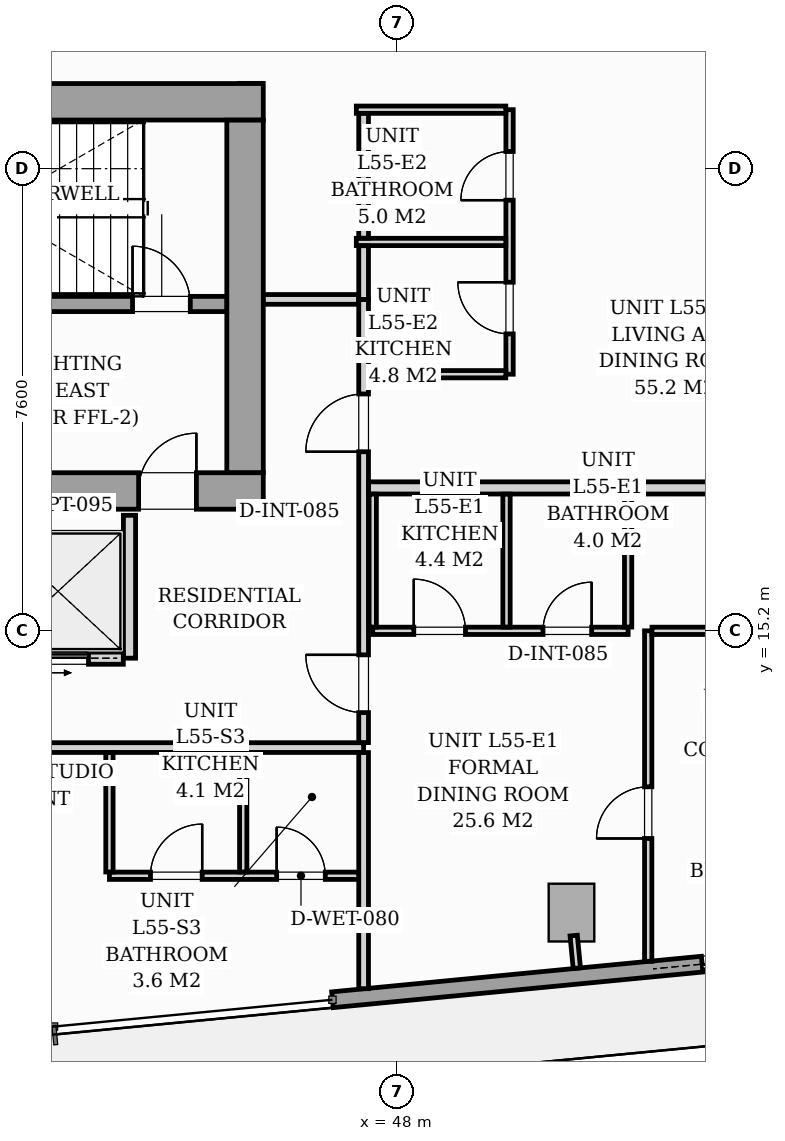
"""IFC4 building model, lengths in metres.
Left out: names, types, materials, properties, quantities, classifications, styles, units other than length and angle.
Written with IfcOpenShell. Run it as: python <this file> out.ifc"""

import sys

from ifc_helpers import new_model, si_unit, direction, frame, frame_2d, origin, origin_2d, place, context, subcontext, project, spatial, rectangle, i_section, extrude, source, transform, mapped, element, fill, save


model = new_model("IFC4")
c1 = context("Model", 3, precision=1e-05, world=origin(), true_north=direction((0.0, 1.0)))
c2 = subcontext(c1, "Body", "Model", "MODEL_VIEW")
j1 = project(units=[si_unit("LENGTHUNIT", "METRE"), si_unit("PLANEANGLEUNIT", "RADIAN")], contexts=[c1])
p1 = place(None, origin())
s1 = spatial("IfcSite", under=j1, at=p1, CompositionType="ELEMENT")
p2 = place(p1, origin())
s2 = spatial("IfcBuilding", under=s1, at=p2, CompositionType="ELEMENT")
p3 = place(p2, frame((0.0, 0.0, 192.2)))
s3 = spatial("IfcBuildingStorey", under=s2, at=p3, CompositionType="ELEMENT", Elevation=192.2)
m1 = source(origin(), c2, "Body", "SweptSolid", [
    extrude(i_section(OverallWidth=0.416, OverallDepth=0.446, WebThickness=0.039, FlangeThickness=0.063, FilletRadius=0.018, at=origin_2d()), origin(), (0.0, 0.0, 1.0), 3.196),
])
for number, where, z_axis, x_axis in (
    (1, (45.6, 17.4, 0.002), (0.0, 0.0, 1.0), (1.0, 0.0, 0.0)),
    (2, (45.6, 24.0, 0.002), (0.0, 0.0, 1.0), (1.0, 0.0, 0.0)),
):
    element("IfcColumn", number, at=place(p3, frame(where, z_axis=z_axis, x_axis=x_axis)), inside=s3, PredefinedType="PILASTER", context=c2, shape_type="MappedRepresentation", body=[
        mapped(m1, transform((0.0, 0.0, 0.0), scale=1.0)),
    ])
m2 = source(origin(), c2, "Body", "SweptSolid", [
    extrude(rectangle(XDim=0.75, YDim=0.95, at=origin_2d()), origin(), (0.0, 0.0, 1.0), 3.196),
])
p4 = place(p3, frame((50.868, 10.566, 0.002), z_axis=(0.0, 0.0, 1.0), x_axis=(0.995396198367, 0.09584575252, 0.0)))
e3 = element("IfcColumn", 3, at=p4, inside=s3, PredefinedType="COLUMN", context=c2, shape_type="MappedRepresentation", body=[
    mapped(m2, transform((0.0, 0.0, 0.0), scale=1.0)),
])
p5 = place(p3, frame((62.963, 10.676, 0.0), z_axis=(0.0, 0.0, 1.0), x_axis=(-0.995395627913, -0.095851676732, 0.0)))
e4 = element("IfcWall", 4, at=p5, inside=s3, PredefinedType="STANDARD", context=c2, shape_type="SweptSolid", body=[
    extrude(rectangle(XDim=16.1, YDim=0.26, at=frame_2d((8.05, 0.0))), origin(), (0.0, 0.0, 1.0), 2.94),
])
p6 = place(p5, frame((8.192, 0.0, 0.0)))
e5 = element("IfcOpeningElement", 5, at=p6, cuts=e4, PredefinedType="OPENING", context=c2, shape_type="SweptSolid", body=[
    extrude(rectangle(XDim=1.8, YDim=2.06, at=frame_2d((0.9, 1.03))), frame((0.0, 0.14, 0.0), z_axis=(0.0, -1.0, 0.0), x_axis=(1.0, 0.0, 0.0)), (0.0, 0.0, 1.0), 0.28),
])
p7 = place(p5, frame((2.05, 0.0, 0.65)))
e6 = element("IfcOpeningElement", 6, at=p7, cuts=e4, PredefinedType="OPENING", context=c2, shape_type="SweptSolid", body=[
    extrude(rectangle(XDim=1.6, YDim=1.5, at=frame_2d((0.8, 0.75))), frame((0.0, 0.14, 0.0), z_axis=(0.0, -1.0, 0.0), x_axis=(1.0, 0.0, 0.0)), (0.0, 0.0, 1.0), 0.28),
])
p8 = place(p3, frame((26.2, 17.5, 0.0), z_axis=(0.0, 0.0, 1.0), x_axis=(1.0, 0.0, 0.0)))
e7 = element("IfcWall", 7, at=p8, inside=s3, PredefinedType="SHEAR", context=c2, shape_type="SweptSolid", body=[
    extrude(rectangle(XDim=19.6, YDim=0.6, at=frame_2d((9.8, 0.0))), origin(), (0.0, 0.0, 1.0), 3.2),
])
p9 = place(p8, frame((0.95, 0.0, 0.0)))
e8 = element("IfcOpeningElement", 8, at=p9, cuts=e7, PredefinedType="OPENING", context=c2, shape_type="SweptSolid", body=[
    extrude(rectangle(XDim=0.95, YDim=2.06, at=frame_2d((0.475, 1.03))), frame((0.0, 0.31, 0.0), z_axis=(0.0, -1.0, 0.0), x_axis=(1.0, 0.0, 0.0)), (0.0, 0.0, 1.0), 0.62),
])
p10 = place(p8, frame((9.38, 0.0, 0.0)))
e9 = element("IfcOpeningElement", 9, at=p10, cuts=e7, PredefinedType="OPENING", context=c2, shape_type="SweptSolid", body=[
    extrude(rectangle(XDim=0.85, YDim=2.0, at=frame_2d((0.425, 1.0))), frame((0.0, 0.31, 0.0), z_axis=(0.0, -1.0, 0.0), x_axis=(1.0, 0.0, 0.0)), (0.0, 0.0, 1.0), 0.62),
])
p11 = place(p8, frame((17.55, 0.0, 0.0)))
e10 = element("IfcOpeningElement", 10, at=p11, cuts=e7, PredefinedType="OPENING", context=c2, shape_type="SweptSolid", body=[
    extrude(rectangle(XDim=0.95, YDim=2.06, at=frame_2d((0.475, 1.03))), frame((0.0, 0.31, 0.0), z_axis=(0.0, -1.0, 0.0), x_axis=(1.0, 0.0, 0.0)), (0.0, 0.0, 1.0), 0.62),
])
p12 = place(p3, frame((26.2, 23.9, 0.0), z_axis=(0.0, 0.0, 1.0), x_axis=(1.0, 0.0, 0.0)))
e11 = element("IfcWall", 11, at=p12, inside=s3, PredefinedType="SHEAR", context=c2, shape_type="SweptSolid", body=[
    extrude(rectangle(XDim=19.6, YDim=0.6, at=frame_2d((9.8, 0.0))), origin(), (0.0, 0.0, 1.0), 3.2),
])
p13 = place(p3, frame((45.5, 17.802, 0.0), z_axis=(0.0, 0.0, 1.0), x_axis=(0.0, 1.0, 0.0)))
e12 = element("IfcWall", 12, at=p13, inside=s3, PredefinedType="SHEAR", context=c2, shape_type="SweptSolid", body=[
    extrude(rectangle(XDim=5.796, YDim=0.6, at=frame_2d((2.898, 0.0))), origin(), (0.0, 0.0, 1.0), 3.2),
])
p14 = place(p3, frame((37.05, 20.575, 0.0), z_axis=(0.0, 0.0, 1.0), x_axis=(1.0, 0.0, 0.0)))
e13 = element("IfcWall", 13, at=p14, inside=s3, PredefinedType="SOLIDWALL", context=c2, shape_type="SweptSolid", body=[
    extrude(rectangle(XDim=8.148, YDim=0.25, at=frame_2d((4.074, 0.0))), origin(), (0.0, 0.0, 1.0), 3.2),
])
p15 = place(p14, frame((6.6, 0.0, 0.0)))
e14 = element("IfcOpeningElement", 14, at=p15, cuts=e13, PredefinedType="OPENING", context=c2, shape_type="SweptSolid", body=[
    extrude(rectangle(XDim=0.95, YDim=2.06, at=frame_2d((0.475, 1.03))), frame((0.0, 0.135, 0.0), z_axis=(0.0, -1.0, 0.0), x_axis=(1.0, 0.0, 0.0)), (0.0, 0.0, 1.0), 0.27),
])
p16 = place(p3, frame((43.6, 14.75, 0.0), z_axis=(0.0, 0.0, 1.0), x_axis=(0.0, 1.0, 0.0)))
e15 = element("IfcWall", 15, at=p16, inside=s3, PredefinedType="PARTITIONING", context=c2, shape_type="SweptSolid", body=[
    extrude(rectangle(XDim=2.35, YDim=0.2, at=frame_2d((1.175, 0.0))), origin(), (0.0, 0.0, 1.0), 2.94),
])
p17 = place(p3, frame((41.352, 14.75, 0.0), z_axis=(0.0, 0.0, 1.0), x_axis=(1.0, 0.0, 0.0)))
e16 = element("IfcWall", 16, at=p17, inside=s3, PredefinedType="PARTITIONING", context=c2, shape_type="SweptSolid", body=[
    extrude(rectangle(XDim=2.146, YDim=0.2, at=frame_2d((1.073, 0.0))), origin(), (0.0, 0.0, 1.0), 2.94),
])
p18 = place(p17, frame((0.523, 0.0, 0.0)))
e17 = element("IfcOpeningElement", 17, at=p18, cuts=e16, PredefinedType="OPENING", context=c2, shape_type="SweptSolid", body=[
    extrude(rectangle(XDim=1.05, YDim=2.08, at=frame_2d((0.525, 1.04))), frame((0.0, 0.11, 0.0), z_axis=(0.0, -1.0, 0.0), x_axis=(1.0, 0.0, 0.0)), (0.0, 0.0, 1.0), 0.22),
])
p19 = place(p3, frame((26.12, 13.28, 0.0), z_axis=(0.0, 0.0, 1.0), x_axis=(1.0, 0.0, 0.0)))
e18 = element("IfcWall", 18, at=p19, inside=s3, PredefinedType="PARTITIONING", context=c2, shape_type="SweptSolid", body=[
    extrude(rectangle(XDim=21.33, YDim=0.16, at=frame_2d((10.665, 0.0))), origin(), (0.0, 0.0, 1.0), 2.94),
])
p20 = place(p19, frame((4.704, 0.0, 0.0)))
e19 = element("IfcOpeningElement", 19, at=p20, cuts=e18, PredefinedType="OPENING", context=c2, shape_type="SweptSolid", body=[
    extrude(rectangle(XDim=0.95, YDim=2.06, at=frame_2d((0.475, 1.03))), frame((0.0, 0.09, 0.0), z_axis=(0.0, -1.0, 0.0), x_axis=(1.0, 0.0, 0.0)), (0.0, 0.0, 1.0), 0.18),
])
p21 = place(p19, frame((11.6, 0.0, 0.0)))
e20 = element("IfcOpeningElement", 20, at=p21, cuts=e18, PredefinedType="OPENING", context=c2, shape_type="SweptSolid", body=[
    extrude(rectangle(XDim=0.95, YDim=2.06, at=frame_2d((0.475, 1.03))), frame((0.0, 0.09, 0.0), z_axis=(0.0, -1.0, 0.0), x_axis=(1.0, 0.0, 0.0)), (0.0, 0.0, 1.0), 0.18),
])
p22 = place(p19, frame((14.976, 0.0, 0.0)))
e21 = element("IfcOpeningElement", 21, at=p22, cuts=e18, PredefinedType="OPENING", context=c2, shape_type="SweptSolid", body=[
    extrude(rectangle(XDim=0.95, YDim=2.06, at=frame_2d((0.475, 1.03))), frame((0.0, 0.09, 0.0), z_axis=(0.0, -1.0, 0.0), x_axis=(1.0, 0.0, 0.0)), (0.0, 0.0, 1.0), 0.18),
])
p23 = place(p3, frame((47.45, 9.315, 0.0), z_axis=(0.0, 0.0, 1.0), x_axis=(0.0, 1.0, 0.0)))
e22 = element("IfcWall", 22, at=p23, inside=s3, PredefinedType="PARTITIONING", context=c2, shape_type="SweptSolid", body=[
    extrude(rectangle(XDim=3.883, YDim=0.16, at=frame_2d((1.941, 0.0))), origin(), (0.0, 0.0, 1.0), 2.94),
])
p24 = place(p3, frame((47.45, 13.362, 0.0), z_axis=(0.0, 0.0, 1.0), x_axis=(0.0, 1.0, 0.0)))
e23 = element("IfcWall", 23, at=p24, inside=s3, PredefinedType="PARTITIONING", context=c2, shape_type="SweptSolid", body=[
    extrude(rectangle(XDim=7.288, YDim=0.16, at=frame_2d((3.644, 0.0))), origin(), (0.0, 0.0, 1.0), 2.94),
])
p25 = place(p24, frame((0.493, 0.0, 0.0)))
e24 = element("IfcOpeningElement", 24, at=p25, cuts=e23, PredefinedType="OPENING", context=c2, shape_type="SweptSolid", body=[
    extrude(rectangle(XDim=0.95, YDim=2.06, at=frame_2d((0.475, 1.03))), frame((0.0, 0.09, 0.0), z_axis=(0.0, -1.0, 0.0), x_axis=(1.0, 0.0, 0.0)), (0.0, 0.0, 1.0), 0.18),
])
p26 = place(p24, frame((4.783, 0.0, 0.0)))
e25 = element("IfcOpeningElement", 25, at=p26, cuts=e23, PredefinedType="OPENING", context=c2, shape_type="SweptSolid", body=[
    extrude(rectangle(XDim=0.95, YDim=2.06, at=frame_2d((0.475, 1.03))), frame((0.0, 0.09, 0.0), z_axis=(0.0, -1.0, 0.0), x_axis=(1.0, 0.0, 0.0)), (0.0, 0.0, 1.0), 0.18),
])
p27 = place(p3, frame((45.802, 20.65, 0.0), z_axis=(0.0, 0.0, 1.0), x_axis=(1.0, 0.0, 0.0)))
e26 = element("IfcWall", 26, at=p27, inside=s3, PredefinedType="PARTITIONING", context=c2, shape_type="SweptSolid", body=[
    extrude(rectangle(XDim=1.566, YDim=0.16, at=frame_2d((0.783, 0.0))), origin(), (0.0, 0.0, 1.0), 2.94),
])
p28 = place(p3, frame((43.27, 11.172, 0.0), z_axis=(0.0, 0.0, 1.0), x_axis=(1.0, 0.0, 0.0)))
e27 = element("IfcWall", 27, at=p28, inside=s3, PredefinedType="PARTITIONING", context=c2, shape_type="SweptSolid", body=[
    extrude(rectangle(XDim=4.098, YDim=0.12, at=frame_2d((2.049, 0.0))), origin(), (0.0, 0.0, 1.0), 2.94),
])
p29 = place(p28, frame((0.675, 0.0, 0.0)))
e28 = element("IfcOpeningElement", 28, at=p29, cuts=e27, PredefinedType="OPENING", context=c2, shape_type="SweptSolid", body=[
    extrude(rectangle(XDim=0.85, YDim=2.05, at=frame_2d((0.425, 1.025))), frame((0.0, 0.07, 0.0), z_axis=(0.0, -1.0, 0.0), x_axis=(1.0, 0.0, 0.0)), (0.0, 0.0, 1.0), 0.14),
])
p30 = place(p28, frame((2.75, 0.0, 0.0)))
e29 = element("IfcOpeningElement", 29, at=p30, cuts=e27, PredefinedType="OPENING", context=c2, shape_type="SweptSolid", body=[
    extrude(rectangle(XDim=0.8, YDim=2.02, at=frame_2d((0.4, 1.01))), frame((0.0, 0.07, 0.0), z_axis=(0.0, -1.0, 0.0), x_axis=(1.0, 0.0, 0.0)), (0.0, 0.0, 1.0), 0.14),
])
for number, where, z_axis, x_axis in (
    (30, (43.27, 11.234, 0.0), (0.0, 0.0, 1.0), (0.0, 1.0, 0.0)),
    (31, (45.47, 11.234, 0.0), (0.0, 0.0, 1.0), (0.0, 1.0, 0.0)),
):
    element("IfcWall", number, at=place(p3, frame(where, z_axis=z_axis, x_axis=x_axis)), inside=s3, PredefinedType="PARTITIONING", context=c2, shape_type="SweptSolid", body=[
        extrude(rectangle(XDim=1.964, YDim=0.12, at=frame_2d((0.982, 0.0))), origin(), (0.0, 0.0, 1.0), 2.94),
    ])
p31 = place(p3, frame((47.532, 17.55, 0.0), z_axis=(0.0, 0.0, 1.0), x_axis=(1.0, 0.0, 0.0)))
e32 = element("IfcWall", 32, at=p31, inside=s3, PredefinedType="PARTITIONING", context=c2, shape_type="SweptSolid", body=[
    extrude(rectangle(XDim=17.201, YDim=0.2, at=frame_2d((8.601, 0.0))), origin(), (0.0, 0.0, 1.0), 2.281),
])
p32 = place(p3, frame((47.6, 15.2, 0.0), z_axis=(0.0, 0.0, 1.0), x_axis=(1.0, 0.0, 0.0)))
e33 = element("IfcWall", 33, at=p32, inside=s3, PredefinedType="PARTITIONING", context=c2, shape_type="SweptSolid", body=[
    extrude(rectangle(XDim=4.2, YDim=0.12, at=frame_2d((2.1, 0.0))), origin(), (0.0, 0.0, 1.0), 2.94),
])
p33 = place(p32, frame((0.675, 0.0, 0.0)))
e34 = element("IfcOpeningElement", 34, at=p33, cuts=e33, PredefinedType="OPENING", context=c2, shape_type="SweptSolid", body=[
    extrude(rectangle(XDim=0.85, YDim=2.05, at=frame_2d((0.425, 1.025))), frame((0.0, 0.07, 0.0), z_axis=(0.0, -1.0, 0.0), x_axis=(1.0, 0.0, 0.0)), (0.0, 0.0, 1.0), 0.14),
])
p34 = place(p32, frame((2.8, 0.0, 0.0)))
e35 = element("IfcOpeningElement", 35, at=p34, cuts=e33, PredefinedType="OPENING", context=c2, shape_type="SweptSolid", body=[
    extrude(rectangle(XDim=0.8, YDim=2.02, at=frame_2d((0.4, 1.01))), frame((0.0, 0.07, 0.0), z_axis=(0.0, -1.0, 0.0), x_axis=(1.0, 0.0, 0.0)), (0.0, 0.0, 1.0), 0.14),
])
for number, where, z_axis, x_axis in (
    (36, (47.6, 15.262, 0.0), (0.0, 0.0, 1.0), (0.0, 1.0, 0.0)),
    (37, (49.8, 15.262, 0.0), (0.0, 0.0, 1.0), (0.0, 1.0, 0.0)),
    (38, (51.8, 15.262, 0.0), (0.0, 0.0, 1.0), (0.0, 1.0, 0.0)),
):
    element("IfcWall", number, at=place(p3, frame(where, z_axis=z_axis, x_axis=x_axis)), inside=s3, PredefinedType="PARTITIONING", context=c2, shape_type="SweptSolid", body=[
        extrude(rectangle(XDim=2.186, YDim=0.12, at=frame_2d((1.093, 0.0))), origin(), (0.0, 0.0, 1.0), 2.94),
    ])
p35 = place(p3, frame((52.13, 9.766, 0.0), z_axis=(0.0, 0.0, 1.0), x_axis=(0.0, 1.0, 0.0)))
e39 = element("IfcWall", 39, at=p35, inside=s3, PredefinedType="PARTITIONING", context=c2, shape_type="SweptSolid", body=[
    extrude(rectangle(XDim=5.434, YDim=0.12, at=frame_2d((2.717, 0.0))), origin(), (0.0, 0.0, 1.0), 2.94),
])
p36 = place(p35, frame((2.019, 0.0, 0.0)))
e40 = element("IfcOpeningElement", 40, at=p36, cuts=e39, PredefinedType="OPENING", context=c2, shape_type="SweptSolid", body=[
    extrude(rectangle(XDim=0.85, YDim=2.05, at=frame_2d((0.425, 1.025))), frame((0.0, 0.07, 0.0), z_axis=(0.0, -1.0, 0.0), x_axis=(1.0, 0.0, 0.0)), (0.0, 0.0, 1.0), 0.14),
])
p37 = place(p3, frame((52.192, 15.2, 0.0), z_axis=(0.0, 0.0, 1.0), x_axis=(1.0, 0.0, 0.0)))
e41 = element("IfcWall", 41, at=p37, inside=s3, PredefinedType="PARTITIONING", context=c2, shape_type="SweptSolid", body=[
    extrude(rectangle(XDim=4.206, YDim=0.12, at=frame_2d((2.103, 0.0))), origin(), (0.0, 0.0, 1.0), 2.94),
])
p38 = place(p3, frame((49.85, 19.42, 0.0), z_axis=(0.0, 0.0, 1.0), x_axis=(0.0, 1.0, 0.0)))
e42 = element("IfcWall", 42, at=p38, inside=s3, PredefinedType="PARTITIONING", context=c2, shape_type="SweptSolid", body=[
    extrude(rectangle(XDim=4.35, YDim=0.12, at=frame_2d((2.175, 0.0))), origin(), (0.0, 0.0, 1.0), 2.94),
])
p39 = place(p38, frame((0.663, 0.0, 0.0)))
e43 = element("IfcOpeningElement", 43, at=p39, cuts=e42, PredefinedType="OPENING", context=c2, shape_type="SweptSolid", body=[
    extrude(rectangle(XDim=0.85, YDim=2.05, at=frame_2d((0.425, 1.025))), frame((0.0, 0.07, 0.0), z_axis=(0.0, -1.0, 0.0), x_axis=(1.0, 0.0, 0.0)), (0.0, 0.0, 1.0), 0.14),
])
p40 = place(p38, frame((2.862, 0.0, 0.0)))
e44 = element("IfcOpeningElement", 44, at=p40, cuts=e42, PredefinedType="OPENING", context=c2, shape_type="SweptSolid", body=[
    extrude(rectangle(XDim=0.8, YDim=2.02, at=frame_2d((0.4, 1.01))), frame((0.0, 0.07, 0.0), z_axis=(0.0, -1.0, 0.0), x_axis=(1.0, 0.0, 0.0)), (0.0, 0.0, 1.0), 0.14),
])
p41 = place(p3, frame((47.33, 21.595, 0.0), z_axis=(0.0, 0.0, 1.0), x_axis=(1.0, 0.0, 0.0)))
e45 = element("IfcWall", 45, at=p41, inside=s3, PredefinedType="PARTITIONING", context=c2, shape_type="SweptSolid", body=[
    extrude(rectangle(XDim=2.458, YDim=0.12, at=frame_2d((1.229, 0.0))), origin(), (0.0, 0.0, 1.0), 2.94),
])
p42 = place(p3, frame((47.532, 19.42, 0.0), z_axis=(0.0, 0.0, 1.0), x_axis=(1.0, 0.0, 0.0)))
e46 = element("IfcWall", 46, at=p42, inside=s3, PredefinedType="PARTITIONING", context=c2, shape_type="SweptSolid", body=[
    extrude(rectangle(XDim=2.256, YDim=0.12, at=frame_2d((1.128, 0.0))), origin(), (0.0, 0.0, 1.0), 2.94),
])
p43 = place(p3, frame((47.33, 23.77, 0.0), z_axis=(0.0, 0.0, 1.0), x_axis=(1.0, 0.0, 0.0)))
e47 = element("IfcWall", 47, at=p43, inside=s3, PredefinedType="PARTITIONING", context=c2, shape_type="SweptSolid", body=[
    extrude(rectangle(XDim=2.458, YDim=0.12, at=frame_2d((1.229, 0.0))), origin(), (0.0, 0.0, 1.0), 2.94),
])
p44 = place(p3, frame((47.45, 20.65, 0.0), z_axis=(0.0, 0.0, 1.0), x_axis=(0.0, 1.0, 0.0)))
e48 = element("IfcWall", 48, at=p44, inside=s3, PredefinedType="PARTITIONING", context=c2, shape_type="SweptSolid", body=[
    extrude(rectangle(XDim=0.883, YDim=0.16, at=frame_2d((0.441, 0.0))), origin(), (0.0, 0.0, 1.0), 2.94),
])
p45 = place(p3, frame((47.45, 21.657, 0.0), z_axis=(0.0, 0.0, 1.0), x_axis=(0.0, 1.0, 0.0)))
e49 = element("IfcWall", 49, at=p45, inside=s3, PredefinedType="PARTITIONING", context=c2, shape_type="SweptSolid", body=[
    extrude(rectangle(XDim=2.051, YDim=0.16, at=frame_2d((1.025, 0.0))), origin(), (0.0, 0.0, 1.0), 2.94),
])
p46 = place(p3, frame((50.905, 10.188, 0.0), z_axis=(0.0, 0.0, 1.0), x_axis=(0.095772948675, -0.995403205893, 0.0)))
e50 = element("IfcWall", 50, at=p46, inside=s3, PredefinedType="PARTITIONING", context=c2, shape_type="SweptSolid", body=[
    extrude(rectangle(XDim=0.538, YDim=0.12, at=frame_2d((0.269, 0.0))), origin(), (0.0, 0.0, 1.0), 2.94),
])
m3 = source(origin(), c2, "Body", "SweptSolid", [
    extrude(rectangle(XDim=1.8, YDim=2.06, at=frame_2d((0.9, 1.03))), frame((0.0, 0.025, 0.0), z_axis=(0.0, -1.0, 0.0), x_axis=(1.0, 0.0, 0.0)), (0.0, 0.0, 1.0), 0.05),
])
p47 = place(p6, origin())
e51 = element("IfcDoor", 51, at=p47, inside=s3, OperationType="SLIDING_TO_RIGHT", PredefinedType="DOOR", context=c2, shape_type="MappedRepresentation", body=[
    mapped(m3, transform((0.0, 0.0, 0.0), scale=1.0)),
])
fill(e5, e51)
m4 = source(origin(), c2, "Body", "SweptSolid", [
    extrude(rectangle(XDim=0.95, YDim=2.06, at=frame_2d((0.475, 1.03))), frame((0.0, 0.025, 0.0), z_axis=(0.0, -1.0, 0.0), x_axis=(1.0, 0.0, 0.0)), (0.0, 0.0, 1.0), 0.05),
])
p48 = place(p11, origin())
e52 = element("IfcDoor", 52, at=p48, inside=s3, OperationType="SINGLE_SWING_RIGHT", PredefinedType="DOOR", context=c2, shape_type="MappedRepresentation", body=[
    mapped(m4, transform((0.0, 0.0, 0.0), scale=1.0)),
])
fill(e10, e52)
p49 = place(p15, origin())
e53 = element("IfcDoor", 53, at=p49, inside=s3, OperationType="SINGLE_SWING_LEFT", PredefinedType="DOOR", context=c2, shape_type="MappedRepresentation", body=[
    mapped(m4, transform((0.0, 0.0, 0.0), scale=1.0)),
])
fill(e14, e53)
m5 = source(origin(), c2, "Body", "SweptSolid", [
    extrude(rectangle(XDim=1.05, YDim=2.08, at=frame_2d((0.525, 1.04))), frame((0.0, 0.025, 0.0), z_axis=(0.0, -1.0, 0.0), x_axis=(1.0, 0.0, 0.0)), (0.0, 0.0, 1.0), 0.05),
])
p50 = place(p18, origin())
e54 = element("IfcDoor", 54, at=p50, inside=s3, OperationType="SLIDING_TO_RIGHT", PredefinedType="DOOR", context=c2, shape_type="MappedRepresentation", body=[
    mapped(m5, transform((0.0, 0.0, 0.0), scale=1.0)),
])
fill(e17, e54)
m6 = source(origin(), c2, "Body", "SweptSolid", [
    extrude(rectangle(XDim=0.85, YDim=2.05, at=frame_2d((0.425, 1.025))), frame((0.0, 0.025, 0.0), z_axis=(0.0, -1.0, 0.0), x_axis=(1.0, 0.0, 0.0)), (0.0, 0.0, 1.0), 0.05),
])
p51 = place(p29, origin())
e55 = element("IfcDoor", 55, at=p51, inside=s3, OperationType="SINGLE_SWING_RIGHT", PredefinedType="DOOR", context=c2, shape_type="MappedRepresentation", body=[
    mapped(m6, transform((0.0, 0.0, 0.0), scale=1.0)),
])
fill(e28, e55)
m7 = source(origin(), c2, "Body", "SweptSolid", [
    extrude(rectangle(XDim=0.8, YDim=2.02, at=frame_2d((0.4, 1.01))), frame((0.0, 0.025, 0.0), z_axis=(0.0, -1.0, 0.0), x_axis=(1.0, 0.0, 0.0)), (0.0, 0.0, 1.0), 0.05),
])
p52 = place(p30, origin())
e56 = element("IfcDoor", 56, at=p52, inside=s3, OperationType="SINGLE_SWING_LEFT", PredefinedType="DOOR", context=c2, shape_type="MappedRepresentation", body=[
    mapped(m7, transform((0.0, 0.0, 0.0), scale=1.0)),
])
fill(e29, e56)
m8 = source(origin(), c2, "Body", "SweptSolid", [
    extrude(rectangle(XDim=0.95, YDim=2.06, at=frame_2d((0.475, 1.03))), frame((0.0, 0.025, 0.0), z_axis=(0.0, -1.0, 0.0), x_axis=(1.0, 0.0, 0.0)), (0.0, 0.0, 1.0), 0.05),
])
p53 = place(p25, origin())
e57 = element("IfcDoor", 57, at=p53, inside=s3, OperationType="SINGLE_SWING_RIGHT", PredefinedType="DOOR", context=c2, shape_type="MappedRepresentation", body=[
    mapped(m8, transform((0.0, 0.0, 0.0), scale=1.0)),
])
fill(e24, e57)
p54 = place(p36, origin())
e58 = element("IfcDoor", 58, at=p54, inside=s3, OperationType="SINGLE_SWING_LEFT", PredefinedType="DOOR", context=c2, shape_type="MappedRepresentation", body=[
    mapped(m6, transform((0.0, 0.0, 0.0), scale=1.0)),
])
fill(e40, e58)
p55 = place(p33, origin())
e59 = element("IfcDoor", 59, at=p55, inside=s3, OperationType="SINGLE_SWING_LEFT", PredefinedType="DOOR", context=c2, shape_type="MappedRepresentation", body=[
    mapped(m6, transform((0.0, 0.0, 0.0), scale=1.0)),
])
fill(e34, e59)
p56 = place(p34, origin())
e60 = element("IfcDoor", 60, at=p56, inside=s3, OperationType="SINGLE_SWING_RIGHT", PredefinedType="DOOR", context=c2, shape_type="MappedRepresentation", body=[
    mapped(m7, transform((0.0, 0.0, 0.0), scale=1.0)),
])
fill(e35, e60)
p57 = place(p26, origin())
e61 = element("IfcDoor", 61, at=p57, inside=s3, OperationType="SINGLE_SWING_LEFT", PredefinedType="DOOR", context=c2, shape_type="MappedRepresentation", body=[
    mapped(m8, transform((0.0, 0.0, 0.0), scale=1.0)),
])
fill(e25, e61)
p58 = place(p39, origin())
e62 = element("IfcDoor", 62, at=p58, inside=s3, OperationType="SINGLE_SWING_RIGHT", PredefinedType="DOOR", context=c2, shape_type="MappedRepresentation", body=[
    mapped(m6, transform((0.0, 0.0, 0.0), scale=1.0)),
])
fill(e43, e62)
p59 = place(p40, origin())
e63 = element("IfcDoor", 63, at=p59, inside=s3, OperationType="SINGLE_SWING_LEFT", PredefinedType="DOOR", context=c2, shape_type="MappedRepresentation", body=[
    mapped(m7, transform((0.0, 0.0, 0.0), scale=1.0)),
])
fill(e44, e63)
save(model, sys.argv[1])
